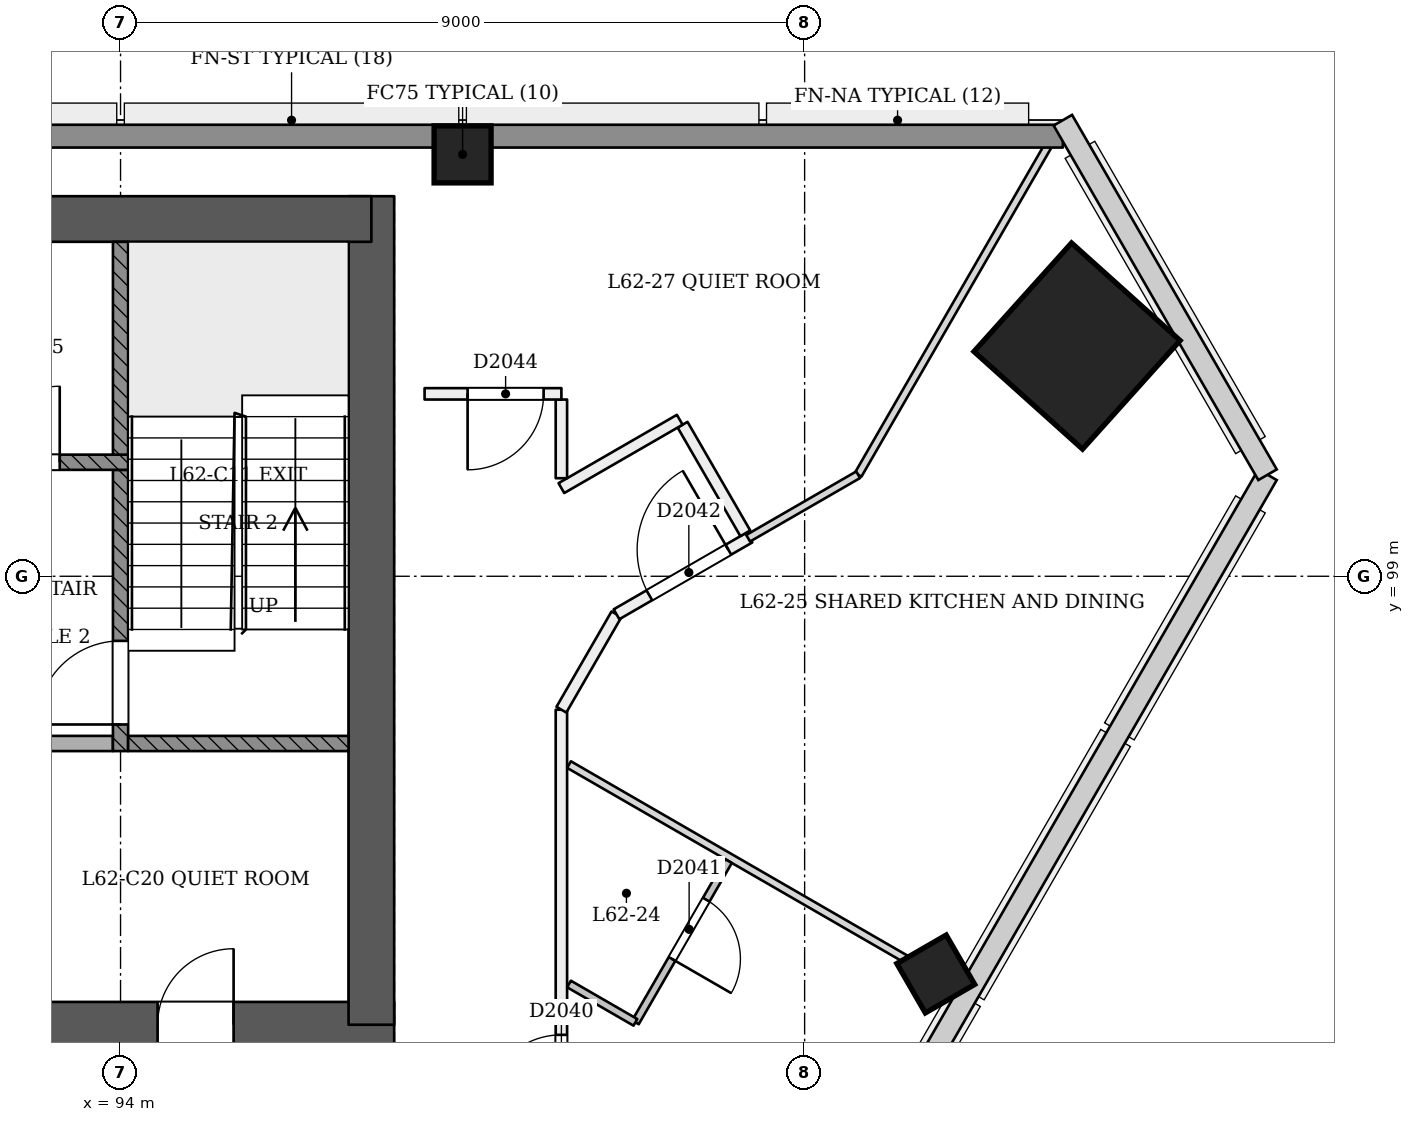
"""IFC4 building model, lengths in metres.
Left out: names, types, materials, properties, quantities, classifications, styles, units other than length and angle.
Written with IfcOpenShell. Run it as: python <this file> out.ifc"""

import sys

from ifc_helpers import new_model, si_unit, direction, frame, frame_2d, origin, origin_2d, place, context, subcontext, project, spatial, rectangle, extrude, element, fill, save


model = new_model("IFC4")
c1 = context("Model", 3, precision=1e-05, world=origin(), true_north=direction((0.0, 1.0)))
c2 = subcontext(c1, "Body", "Model", "MODEL_VIEW")
j1 = project(units=[si_unit("LENGTHUNIT", "METRE"), si_unit("PLANEANGLEUNIT", "RADIAN")], contexts=[c1])
p1 = place(None, origin())
s1 = spatial("IfcSite", under=j1, at=p1, CompositionType="ELEMENT")
p2 = place(p1, origin())
s2 = spatial("IfcBuilding", under=s1, at=p2, CompositionType="ELEMENT")
p3 = place(p2, frame((0.0, 0.0, 242.8)))
s3 = spatial("IfcBuildingStorey", under=s2, at=p3, CompositionType="ELEMENT", Elevation=242.8)
p4 = place(p3, frame((72.7, 93.1, 0.0), z_axis=(0.0, 0.0, 1.0), x_axis=(1.0, 0.0, 0.0)))
e1 = element("IfcWall", 1, at=p4, inside=s3, PredefinedType="SHEAR", context=c2, shape_type="SweptSolid", body=[
    extrude(rectangle(XDim=24.9, YDim=0.6, at=frame_2d((12.45, 0.0))), origin(), (0.0, 0.0, 1.0), 3.6),
])
p5 = place(p4, frame((1.1, 0.0, 0.0)))
e2 = element("IfcOpeningElement", 2, at=p5, cuts=e1, PredefinedType="OPENING", context=c2, shape_type="SweptSolid", body=[
    extrude(rectangle(XDim=1.2, YDim=2.1, at=frame_2d((0.6, 1.05))), frame((0.0, 0.311, 0.0), z_axis=(0.0, -1.0, 0.0), x_axis=(1.0, 0.0, 0.0)), (0.0, 0.0, 1.0), 0.621),
])
p6 = place(p4, frame((3.3, 0.0, 0.0)))
e3 = element("IfcOpeningElement", 3, at=p6, cuts=e1, PredefinedType="OPENING", context=c2, shape_type="SweptSolid", body=[
    extrude(rectangle(XDim=1.2, YDim=2.1, at=frame_2d((0.6, 1.05))), frame((0.0, 0.311, 0.0), z_axis=(0.0, -1.0, 0.0), x_axis=(1.0, 0.0, 0.0)), (0.0, 0.0, 1.0), 0.621),
])
p7 = place(p4, frame((13.3, 0.0, 0.0)))
e4 = element("IfcOpeningElement", 4, at=p7, cuts=e1, PredefinedType="OPENING", context=c2, shape_type="SweptSolid", body=[
    extrude(rectangle(XDim=1.2, YDim=2.1, at=frame_2d((0.6, 1.05))), frame((0.0, 0.311, 0.0), z_axis=(0.0, -1.0, 0.0), x_axis=(1.0, 0.0, 0.0)), (0.0, 0.0, 1.0), 0.621),
])
p8 = place(p4, frame((15.562, 0.0, 0.0)))
e5 = element("IfcOpeningElement", 5, at=p8, cuts=e1, PredefinedType="OPENING", context=c2, shape_type="SweptSolid", body=[
    extrude(rectangle(XDim=1.0, YDim=2.1, at=frame_2d((0.5, 1.05))), frame((0.0, 0.311, 0.0), z_axis=(0.0, -1.0, 0.0), x_axis=(1.0, 0.0, 0.0)), (0.0, 0.0, 1.0), 0.621),
])
p9 = place(p4, frame((18.2, 0.0, 0.0)))
e6 = element("IfcOpeningElement", 6, at=p9, cuts=e1, PredefinedType="OPENING", context=c2, shape_type="SweptSolid", body=[
    extrude(rectangle(XDim=1.0, YDim=2.1, at=frame_2d((0.5, 1.05))), frame((0.0, 0.311, 0.0), z_axis=(0.0, -1.0, 0.0), x_axis=(1.0, 0.0, 0.0)), (0.0, 0.0, 1.0), 0.621),
])
p10 = place(p4, frame((21.788, 0.0, 0.0)))
e7 = element("IfcOpeningElement", 7, at=p10, cuts=e1, PredefinedType="OPENING", context=c2, shape_type="SweptSolid", body=[
    extrude(rectangle(XDim=1.0, YDim=2.1, at=frame_2d((0.5, 1.05))), frame((0.0, 0.311, 0.0), z_axis=(0.0, -1.0, 0.0), x_axis=(1.0, 0.0, 0.0)), (0.0, 0.0, 1.0), 0.621),
])
p11 = place(p3, frame((97.3, 93.1, 0.0), z_axis=(0.0, 0.0, 1.0), x_axis=(0.0, 1.0, 0.0)))
e8 = element("IfcWall", 8, at=p11, inside=s3, PredefinedType="SHEAR", context=c2, shape_type="SweptSolid", body=[
    extrude(rectangle(XDim=10.9, YDim=0.6, at=frame_2d((5.45, 0.0))), origin(), (0.0, 0.0, 1.0), 3.6),
])
p12 = place(p3, frame((97.3, 103.7, 0.0), z_axis=(0.0, 0.0, 1.0), x_axis=(-1.0, 0.0, 0.0)))
e9 = element("IfcWall", 9, at=p12, inside=s3, PredefinedType="SHEAR", context=c2, shape_type="SweptSolid", body=[
    extrude(rectangle(XDim=24.9, YDim=0.6, at=frame_2d((12.45, 0.0))), origin(), (0.0, 0.0, 1.0), 3.6),
])
p13 = place(p3, frame((106.618, 102.018, 0.0), z_axis=(-0.028403739082, 0.009219352065, 0.999554016126), x_axis=(0.500744789622, -0.865309972293, 0.022210527167)))
e10 = element("IfcColumn", 10, at=p13, inside=s3, PredefinedType="COLUMN", context=c2, shape_type="SweptSolid", body=[
    extrude(rectangle(XDim=1.92, YDim=1.92, at=origin_2d()), origin(), (0.0, 0.0, 1.0), 3.602),
])
p14 = place(p3, frame((98.5, 104.55, 0.0), z_axis=(0.0, 0.0, 1.0), x_axis=(1.0, 0.0, 0.0)))
e11 = element("IfcColumn", 11, at=p14, inside=s3, PredefinedType="COLUMN", context=c2, shape_type="SweptSolid", body=[
    extrude(rectangle(XDim=0.75, YDim=0.75, at=origin_2d()), origin(), (0.0, 0.0, 1.0), 3.6),
])
p15 = place(p3, frame((104.752, 93.72, -0.023), z_axis=(-0.022222852987, 0.038483477124, 0.999012095419), x_axis=(-0.500174626395, -0.865639439229, 0.022219459073)))
e12 = element("IfcColumn", 12, at=p15, inside=s3, PredefinedType="COLUMN", context=c2, shape_type="SweptSolid", body=[
    extrude(rectangle(XDim=0.75, YDim=0.75, at=origin_2d()), origin(), (0.0, 0.0, 1.0), 3.604),
])
p16 = place(p3, frame((99.8, 90.6, 0.0), z_axis=(0.0, 0.0, 1.0), x_axis=(0.0, 1.0, 0.0)))
e13 = element("IfcWall", 13, at=p16, inside=s3, PredefinedType="PARTITIONING", context=c2, shape_type="SweptSolid", body=[
    extrude(rectangle(XDim=6.644, YDim=0.15, at=frame_2d((3.322, 0.0))), origin(), (0.0, 0.0, 1.0), 3.2),
])
p17 = place(p16, frame((1.367, 0.0, 0.0)))
e14 = element("IfcOpeningElement", 14, at=p17, cuts=e13, PredefinedType="OPENING", context=c2, shape_type="SweptSolid", body=[
    extrude(rectangle(XDim=1.0, YDim=2.1, at=frame_2d((0.5, 1.05))), frame((0.0, 0.085, 0.0), z_axis=(0.0, -1.0, 0.0), x_axis=(1.0, 0.0, 0.0)), (0.0, 0.0, 1.0), 0.171),
])
p18 = place(p3, frame((99.8, 97.244, 0.0), z_axis=(0.0, 0.0, 1.0), x_axis=(0.499960540515, 0.86604818453, 0.0)))
e15 = element("IfcWall", 15, at=p18, inside=s3, PredefinedType="PARTITIONING", context=c2, shape_type="SweptSolid", body=[
    extrude(rectangle(XDim=1.45, YDim=0.15, at=frame_2d((0.725, 0.0))), origin(), (0.0, 0.0, 1.0), 3.2),
])
p19 = place(p3, frame((100.525, 98.5, 0.0), z_axis=(0.0, 0.0, 1.0), x_axis=(0.866010470582, 0.500025864173, 0.0)))
e16 = element("IfcWall", 16, at=p19, inside=s3, PredefinedType="PARTITIONING", context=c2, shape_type="SweptSolid", body=[
    extrude(rectangle(XDim=2.02, YDim=0.15, at=frame_2d((1.01, 0.0))), origin(), (0.0, 0.0, 1.0), 3.2),
])
p20 = place(p19, frame((0.499, 0.0, 0.0)))
e17 = element("IfcOpeningElement", 17, at=p20, cuts=e16, PredefinedType="OPENING", context=c2, shape_type="SweptSolid", body=[
    extrude(rectangle(XDim=1.2, YDim=2.1, at=frame_2d((0.6, 1.05))), frame((0.0, 0.085, 0.0), z_axis=(0.0, -1.0, 0.0), x_axis=(1.0, 0.0, 0.0)), (0.0, 0.0, 1.0), 0.171),
])
p21 = place(p3, frame((102.219, 99.565, 0.0), z_axis=(0.0, 0.0, 1.0), x_axis=(-0.499974350878, 0.866040211805, 0.0)))
e18 = element("IfcWall", 18, at=p21, inside=s3, PredefinedType="PARTITIONING", context=c2, shape_type="SweptSolid", body=[
    extrude(rectangle(XDim=1.65, YDim=0.15, at=frame_2d((0.825, 0.0))), origin(), (0.0, 0.0, 1.0), 3.2),
])
p22 = place(p3, frame((101.357, 101.059, 0.0), z_axis=(0.0, 0.0, 1.0), x_axis=(-0.866011447264, -0.500024172624, 0.0)))
e19 = element("IfcWall", 19, at=p22, inside=s3, PredefinedType="PARTITIONING", context=c2, shape_type="SweptSolid", body=[
    extrude(rectangle(XDim=1.798, YDim=0.15, at=frame_2d((0.899, 0.0))), origin(), (0.0, 0.0, 1.0), 3.2),
])
p23 = place(p3, frame((99.8, 100.29, 0.0), z_axis=(0.0, 0.0, 1.0), x_axis=(0.0, 1.0, 0.0)))
e20 = element("IfcWall", 20, at=p23, inside=s3, PredefinedType="PARTITIONING", context=c2, shape_type="SweptSolid", body=[
    extrude(rectangle(XDim=1.035, YDim=0.15, at=frame_2d((0.518, 0.0))), origin(), (0.0, 0.0, 1.0), 3.2),
])
p24 = place(p3, frame((99.8, 101.4, 0.0), z_axis=(0.0, 0.0, 1.0), x_axis=(-1.0, 0.0, 0.0)))
e21 = element("IfcWall", 21, at=p24, inside=s3, PredefinedType="PARTITIONING", context=c2, shape_type="SweptSolid", body=[
    extrude(rectangle(XDim=1.8, YDim=0.15, at=frame_2d((0.9, 0.0))), origin(), (0.0, 0.0, 1.0), 3.2),
])
p25 = place(p24, frame((0.234, 0.0, 0.0)))
e22 = element("IfcOpeningElement", 22, at=p25, cuts=e21, PredefinedType="OPENING", context=c2, shape_type="SweptSolid", body=[
    extrude(rectangle(XDim=1.0, YDim=2.1, at=frame_2d((0.5, 1.05))), frame((0.0, 0.085, 0.0), z_axis=(0.0, -1.0, 0.0), x_axis=(1.0, 0.0, 0.0)), (0.0, 0.0, 1.0), 0.171),
])
p26 = place(p3, frame((101.999, 95.253, 0.0), z_axis=(0.0, 0.0, 1.0), x_axis=(-0.500018594424, -0.866014668023, 0.0)))
e23 = element("IfcWall", 23, at=p26, inside=s3, PredefinedType="PARTITIONING", context=c2, shape_type="SweptSolid", body=[
    extrude(rectangle(XDim=2.45, YDim=0.1, at=frame_2d((1.225, 0.0))), origin(), (0.0, 0.0, 1.0), 3.2),
])
p27 = place(p26, frame((0.587, 0.0, 0.0)))
e24 = element("IfcOpeningElement", 24, at=p27, cuts=e23, PredefinedType="OPENING", context=c2, shape_type="SweptSolid", body=[
    extrude(rectangle(XDim=0.9, YDim=2.1, at=frame_2d((0.45, 1.05))), frame((0.0, 0.061, 0.0), z_axis=(0.0, -1.0, 0.0), x_axis=(1.0, 0.0, 0.0)), (0.0, 0.0, 1.0), 0.121),
])
p28 = place(p3, frame((100.774, 93.131, 0.0), z_axis=(0.0, 0.0, 1.0), x_axis=(-0.866016391555, 0.500015609314, 0.0)))
e25 = element("IfcWall", 25, at=p28, inside=s3, PredefinedType="PARTITIONING", context=c2, shape_type="SweptSolid", body=[
    extrude(rectangle(XDim=1.009, YDim=0.1, at=frame_2d((0.505, 0.0))), origin(), (0.0, 0.0, 1.0), 3.2),
])
p29 = place(p3, frame((105.055, 93.546, 0.0), z_axis=(0.0, 0.0, 1.0), x_axis=(-0.866020980388, 0.500007661469, 0.0)))
e26 = element("IfcWall", 26, at=p29, inside=s3, PredefinedType="PARTITIONING", context=c2, shape_type="SweptSolid", body=[
    extrude(rectangle(XDim=5.953, YDim=0.1, at=frame_2d((2.976, 0.0))), origin(), (0.0, 0.0, 1.0), 2.7),
])
p30 = place(p3, frame((106.339, 104.9, 0.0), z_axis=(0.0, 0.0, 1.0), x_axis=(-0.499995114243, -0.866028224559, 0.0)))
e27 = element("IfcWall", 27, at=p30, inside=s3, PredefinedType="PARTITIONING", context=c2, shape_type="SweptSolid", body=[
    extrude(rectangle(XDim=5.271, YDim=0.1, at=frame_2d((2.635, 0.0))), origin(), (0.0, 0.0, 1.0), 2.7),
])
p31 = place(p3, frame((103.704, 100.335, 0.0), z_axis=(0.0, 0.0, 1.0), x_axis=(-0.866059082011, -0.499941663064, 0.0)))
e28 = element("IfcWall", 28, at=p31, inside=s3, PredefinedType="PARTITIONING", context=c2, shape_type="SweptSolid", body=[
    extrude(rectangle(XDim=1.671, YDim=0.1, at=frame_2d((0.835, 0.0))), origin(), (0.0, 0.0, 1.0), 3.2),
])
p32 = place(p3, frame((63.603, 104.79, 0.0), z_axis=(0.0, 0.0, 1.0), x_axis=(1.0, 0.0, 0.0)))
e29 = element("IfcWall", 29, at=p32, inside=s3, PredefinedType="SOLIDWALL", context=c2, shape_type="SweptSolid", body=[
    extrude(rectangle(XDim=42.794, YDim=0.3, at=frame_2d((21.397, 0.0))), origin(), (0.0, 0.0, 1.0), 2.7),
])
p33 = place(p3, frame((91.5, 96.8, 0.0), z_axis=(0.0, 0.0, 1.0), x_axis=(1.0, 0.0, 0.0)))
e30 = element("IfcWall", 30, at=p33, inside=s3, PredefinedType="PARTITIONING", context=c2, shape_type="SweptSolid", body=[
    extrude(rectangle(XDim=2.4, YDim=0.2, at=frame_2d((1.2, 0.0))), origin(), (0.0, 0.0, 1.0), 3.2),
])
p34 = place(p3, frame((94.0, 96.7, 0.0), z_axis=(0.0, 0.0, 1.0), x_axis=(0.0, 1.0, 0.0)))
e31 = element("IfcWall", 31, at=p34, inside=s3, PredefinedType="SOLIDWALL", context=c2, shape_type="SweptSolid", body=[
    extrude(rectangle(XDim=3.7, YDim=0.2, at=frame_2d((1.85, 0.0))), origin(), (0.0, 0.0, 1.0), 3.2),
])
p35 = place(p34, frame((0.35, 0.0, 0.0)))
e32 = element("IfcOpeningElement", 32, at=p35, cuts=e31, PredefinedType="OPENING", context=c2, shape_type="SweptSolid", body=[
    extrude(rectangle(XDim=1.1, YDim=2.1, at=frame_2d((0.55, 1.05))), frame((0.0, 0.11, 0.0), z_axis=(0.0, -1.0, 0.0), x_axis=(1.0, 0.0, 0.0)), (0.0, 0.0, 1.0), 0.221),
])
p36 = place(p3, frame((94.1, 96.8, 0.0), z_axis=(0.0, 0.0, 1.0), x_axis=(1.0, 0.0, 0.0)))
e33 = element("IfcWall", 33, at=p36, inside=s3, PredefinedType="SOLIDWALL", context=c2, shape_type="SweptSolid", body=[
    extrude(rectangle(XDim=2.9, YDim=0.2, at=frame_2d((1.45, 0.0))), origin(), (0.0, 0.0, 1.0), 3.2),
])
p37 = place(p3, frame((75.9, 100.5, 0.0), z_axis=(0.0, 0.0, 1.0), x_axis=(1.0, 0.0, 0.0)))
e34 = element("IfcWall", 34, at=p37, inside=s3, PredefinedType="SOLIDWALL", context=c2, shape_type="SweptSolid", body=[
    extrude(rectangle(XDim=18.2, YDim=0.2, at=frame_2d((9.1, 0.0))), origin(), (0.0, 0.0, 1.0), 3.2),
])
p38 = place(p37, frame((2.6, 0.0, 0.0)))
e35 = element("IfcOpeningElement", 35, at=p38, cuts=e34, PredefinedType="OPENING", context=c2, shape_type="SweptSolid", body=[
    extrude(rectangle(XDim=1.1, YDim=2.1, at=frame_2d((0.55, 1.05))), frame((0.0, 0.11, 0.0), z_axis=(0.0, -1.0, 0.0), x_axis=(1.0, 0.0, 0.0)), (0.0, 0.0, 1.0), 0.221),
])
p39 = place(p37, frame((4.5, 0.0, 0.0)))
e36 = element("IfcOpeningElement", 36, at=p39, cuts=e34, PredefinedType="OPENING", context=c2, shape_type="SweptSolid", body=[
    extrude(rectangle(XDim=1.1, YDim=2.1, at=frame_2d((0.55, 1.05))), frame((0.0, 0.11, 0.0), z_axis=(0.0, -1.0, 0.0), x_axis=(1.0, 0.0, 0.0)), (0.0, 0.0, 1.0), 0.221),
])
p40 = place(p37, frame((6.4, 0.0, 0.0)))
e37 = element("IfcOpeningElement", 37, at=p40, cuts=e34, PredefinedType="OPENING", context=c2, shape_type="SweptSolid", body=[
    extrude(rectangle(XDim=1.1, YDim=2.1, at=frame_2d((0.55, 1.05))), frame((0.0, 0.11, 0.0), z_axis=(0.0, -1.0, 0.0), x_axis=(1.0, 0.0, 0.0)), (0.0, 0.0, 1.0), 0.221),
])
p41 = place(p37, frame((8.3, 0.0, 0.0)))
e38 = element("IfcOpeningElement", 38, at=p41, cuts=e34, PredefinedType="OPENING", context=c2, shape_type="SweptSolid", body=[
    extrude(rectangle(XDim=1.1, YDim=2.1, at=frame_2d((0.55, 1.05))), frame((0.0, 0.11, 0.0), z_axis=(0.0, -1.0, 0.0), x_axis=(1.0, 0.0, 0.0)), (0.0, 0.0, 1.0), 0.221),
])
p42 = place(p37, frame((10.2, 0.0, 0.0)))
e39 = element("IfcOpeningElement", 39, at=p42, cuts=e34, PredefinedType="OPENING", context=c2, shape_type="SweptSolid", body=[
    extrude(rectangle(XDim=1.1, YDim=2.1, at=frame_2d((0.55, 1.05))), frame((0.0, 0.11, 0.0), z_axis=(0.0, -1.0, 0.0), x_axis=(1.0, 0.0, 0.0)), (0.0, 0.0, 1.0), 0.221),
])
p43 = place(p37, frame((12.1, 0.0, 0.0)))
e40 = element("IfcOpeningElement", 40, at=p43, cuts=e34, PredefinedType="OPENING", context=c2, shape_type="SweptSolid", body=[
    extrude(rectangle(XDim=1.1, YDim=2.1, at=frame_2d((0.55, 1.05))), frame((0.0, 0.11, 0.0), z_axis=(0.0, -1.0, 0.0), x_axis=(1.0, 0.0, 0.0)), (0.0, 0.0, 1.0), 0.221),
])
p44 = place(p37, frame((14.0, 0.0, 0.0)))
e41 = element("IfcOpeningElement", 41, at=p44, cuts=e34, PredefinedType="OPENING", context=c2, shape_type="SweptSolid", body=[
    extrude(rectangle(XDim=1.1, YDim=2.1, at=frame_2d((0.55, 1.05))), frame((0.0, 0.11, 0.0), z_axis=(0.0, -1.0, 0.0), x_axis=(1.0, 0.0, 0.0)), (0.0, 0.0, 1.0), 0.221),
])
p45 = place(p37, frame((0.65, 0.0, 0.0)))
e42 = element("IfcOpeningElement", 42, at=p45, cuts=e34, PredefinedType="OPENING", context=c2, shape_type="SweptSolid", body=[
    extrude(rectangle(XDim=1.0, YDim=2.1, at=frame_2d((0.5, 1.05))), frame((0.0, 0.11, 0.0), z_axis=(0.0, -1.0, 0.0), x_axis=(1.0, 0.0, 0.0)), (0.0, 0.0, 1.0), 0.221),
])
p46 = place(p37, frame((16.3, 0.0, 0.0)))
e43 = element("IfcOpeningElement", 43, at=p46, cuts=e34, PredefinedType="OPENING", context=c2, shape_type="SweptSolid", body=[
    extrude(rectangle(XDim=1.0, YDim=2.1, at=frame_2d((0.5, 1.05))), frame((0.0, 0.11, 0.0), z_axis=(0.0, -1.0, 0.0), x_axis=(1.0, 0.0, 0.0)), (0.0, 0.0, 1.0), 0.221),
])
p47 = place(p3, frame((94.0, 100.6, 0.0), z_axis=(0.0, 0.0, 1.0), x_axis=(0.0, 1.0, 0.0)))
e44 = element("IfcWall", 44, at=p47, inside=s3, PredefinedType="SOLIDWALL", context=c2, shape_type="SweptSolid", body=[
    extrude(rectangle(XDim=2.8, YDim=0.2, at=frame_2d((1.4, 0.0))), origin(), (0.0, 0.0, 1.0), 3.2),
])
p48 = place(p17, origin())
e45 = element("IfcDoor", 45, at=p48, inside=s3, OperationType="SINGLE_SWING_LEFT", PredefinedType="NOTDEFINED", context=c2, shape_type="SweptSolid", body=[
    extrude(rectangle(XDim=1.0, YDim=2.1, at=frame_2d((0.5, 1.05))), frame((0.0, 0.025, 0.0), z_axis=(0.0, -1.0, 0.0), x_axis=(1.0, 0.0, 0.0)), (0.0, 0.0, 1.0), 0.05),
])
fill(e14, e45)
p49 = place(p27, origin())
e46 = element("IfcDoor", 46, at=p49, inside=s3, OperationType="SINGLE_SWING_RIGHT", PredefinedType="NOTDEFINED", context=c2, shape_type="SweptSolid", body=[
    extrude(rectangle(XDim=0.9, YDim=2.1, at=frame_2d((0.45, 1.05))), frame((0.0, 0.025, 0.0), z_axis=(0.0, -1.0, 0.0), x_axis=(1.0, 0.0, 0.0)), (0.0, 0.0, 1.0), 0.05),
])
fill(e24, e46)
p50 = place(p20, origin())
e47 = element("IfcDoor", 47, at=p50, inside=s3, OperationType="SINGLE_SWING_RIGHT", PredefinedType="NOTDEFINED", context=c2, shape_type="SweptSolid", body=[
    extrude(rectangle(XDim=1.2, YDim=2.1, at=frame_2d((0.6, 1.05))), frame((0.0, 0.025, 0.0), z_axis=(0.0, -1.0, 0.0), x_axis=(1.0, 0.0, 0.0)), (0.0, 0.0, 1.0), 0.05),
])
fill(e17, e47)
p51 = place(p25, origin())
e48 = element("IfcDoor", 48, at=p51, inside=s3, OperationType="SINGLE_SWING_RIGHT", PredefinedType="NOTDEFINED", context=c2, shape_type="SweptSolid", body=[
    extrude(rectangle(XDim=1.0, YDim=2.1, at=frame_2d((0.5, 1.05))), frame((0.0, 0.025, 0.0), z_axis=(0.0, -1.0, 0.0), x_axis=(1.0, 0.0, 0.0)), (0.0, 0.0, 1.0), 0.05),
])
fill(e22, e48)
p52 = place(p35, origin())
e49 = element("IfcDoor", 49, at=p52, inside=s3, OperationType="SINGLE_SWING_LEFT", PredefinedType="NOTDEFINED", context=c2, shape_type="SweptSolid", body=[
    extrude(rectangle(XDim=1.1, YDim=2.1, at=frame_2d((0.55, 1.05))), frame((0.0, 0.025, 0.0), z_axis=(0.0, -1.0, 0.0), x_axis=(1.0, 0.0, 0.0)), (0.0, 0.0, 1.0), 0.05),
])
fill(e32, e49)
p53 = place(p46, origin())
e50 = element("IfcDoor", 50, at=p53, inside=s3, OperationType="SINGLE_SWING_RIGHT", PredefinedType="NOTDEFINED", context=c2, shape_type="SweptSolid", body=[
    extrude(rectangle(XDim=1.0, YDim=2.1, at=frame_2d((0.5, 1.05))), frame((0.0, 0.025, 0.0), z_axis=(0.0, -1.0, 0.0), x_axis=(1.0, 0.0, 0.0)), (0.0, 0.0, 1.0), 0.05),
])
fill(e43, e50)
p54 = place(p10, origin())
e51 = element("IfcDoor", 51, at=p54, inside=s3, OperationType="SINGLE_SWING_RIGHT", PredefinedType="NOTDEFINED", context=c2, shape_type="SweptSolid", body=[
    extrude(rectangle(XDim=1.0, YDim=2.1, at=frame_2d((0.5, 1.05))), frame((0.0, 0.025, 0.0), z_axis=(0.0, -1.0, 0.0), x_axis=(1.0, 0.0, 0.0)), (0.0, 0.0, 1.0), 0.05),
])
fill(e7, e51)
save(model, sys.argv[1])
